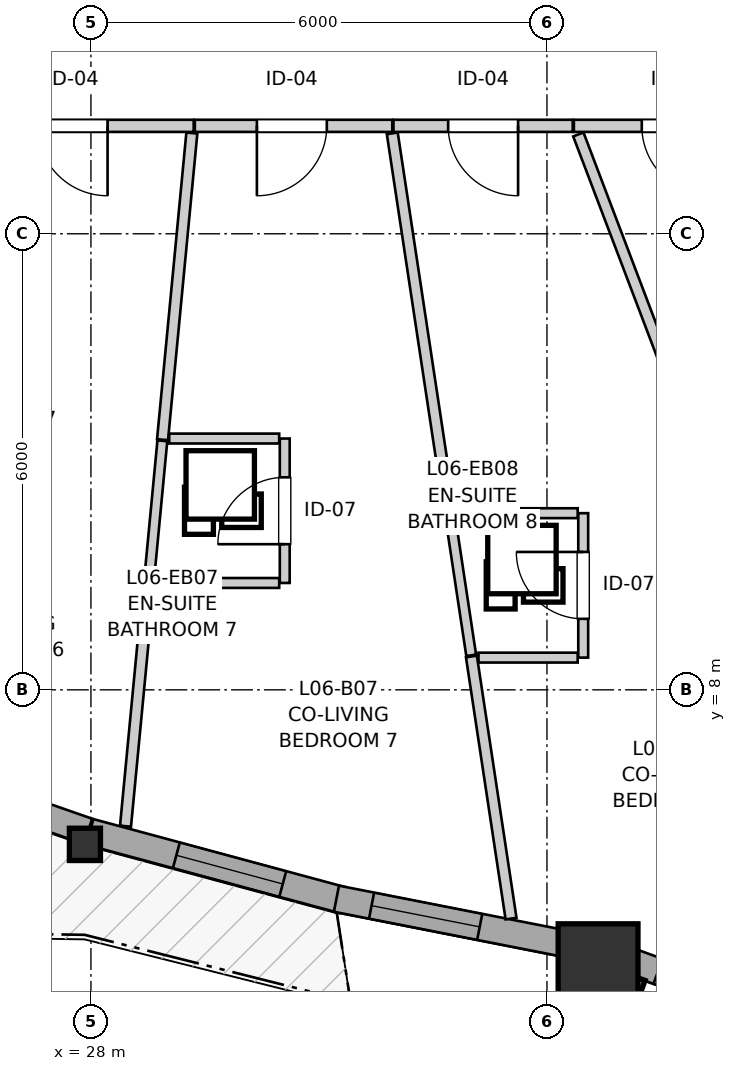
"""IFC4 building model, lengths in metres.
Left out: names, types, materials, properties, quantities, classifications, styles, units other than length and angle.
Written with IfcOpenShell. Run it as: python <this file> out.ifc"""

import sys

from ifc_helpers import new_model, si_unit, direction, frame, frame_2d, origin, origin_2d, place, context, subcontext, project, spatial, rectangle, i_section, extrude, source, transform, mapped, element, fill, save


model = new_model("IFC4")
c1 = context("Model", 3, precision=1e-05, world=origin(), true_north=direction((0.0, 1.0)))
c2 = subcontext(c1, "Body", "Model", "MODEL_VIEW")
j1 = project(units=[si_unit("LENGTHUNIT", "METRE"), si_unit("PLANEANGLEUNIT", "RADIAN")], contexts=[c1])
p1 = place(None, origin())
s1 = spatial("IfcSite", under=j1, at=p1, CompositionType="ELEMENT")
p2 = place(p1, origin())
s2 = spatial("IfcBuilding", under=s1, at=p2, CompositionType="ELEMENT")
p3 = place(p2, frame((0.0, 0.0, 23.8)))
s3 = spatial("IfcBuildingStorey", under=s2, at=p3, CompositionType="ELEMENT", Elevation=23.8)
m1 = source(origin(), c2, "Body", "SweptSolid", [
    extrude(i_section(OverallWidth=0.409, OverallDepth=0.425, WebThickness=0.03, FlangeThickness=0.048, FilletRadius=0.015, at=origin_2d()), origin(), (0.0, 0.0, 1.0), 2.935),
])
p4 = place(p3, frame((27.921, 5.967, 0.0), z_axis=(0.0, 0.0, 1.0), x_axis=(1.0, 0.0, 0.0)))
e1 = element("IfcColumn", 1, at=p4, inside=s3, PredefinedType="PILASTER", context=c2, shape_type="MappedRepresentation", body=[
    mapped(m1, transform((0.0, 0.0, 0.0), x_axis=(1.0, 0.0, 0.0), y_axis=(0.0, 1.0, 0.0), z_axis=(0.0, 0.0, 1.0), scale=1.0)),
])
m2 = source(origin(), c2, "Body", "SweptSolid", [
    extrude(rectangle(XDim=1.05, YDim=1.05, at=origin_2d()), origin(), (0.0, 0.0, 1.0), 2.935),
])
p5 = place(p3, frame((34.673, 4.397, 0.0), z_axis=(0.0, 0.0, 1.0), x_axis=(1.0, 0.0, 0.0)))
e2 = element("IfcColumn", 2, at=p5, inside=s3, PredefinedType="COLUMN", context=c2, shape_type="MappedRepresentation", body=[
    mapped(m2, transform((0.0, 0.0, 0.0), x_axis=(1.0, 0.0, 0.0), y_axis=(0.0, 1.0, 0.0), z_axis=(0.0, 0.0, 1.0), scale=1.0)),
])
p6 = place(p3, frame((24.756, 7.257, 0.0), z_axis=(0.0, 0.0, 1.0), x_axis=(0.944142925437, -0.329536244361, 0.0)))
e3 = element("IfcWall", 3, at=p6, inside=s3, PredefinedType="SOLIDWALL", context=c2, shape_type="SweptSolid", body=[
    extrude(rectangle(XDim=3.393, YDim=0.35, at=frame_2d((1.697, 0.0))), origin(), (0.0, 0.0, 1.0), 2.415),
])
p7 = place(p6, frame((0.982, 0.0, 0.82)))
e4 = element("IfcOpeningElement", 4, at=p7, cuts=e3, PredefinedType="OPENING", context=c2, shape_type="SweptSolid", body=[
    extrude(rectangle(XDim=1.45, YDim=1.25, at=frame_2d((0.725, 0.625))), frame((0.0, 0.185, 0.0), z_axis=(0.0, -1.0, 0.0), x_axis=(1.0, 0.0, 0.0)), (0.0, 0.0, 1.0), 0.37),
])
p8 = place(p3, frame((27.986, 6.131, 0.0), z_axis=(0.0, 0.0, 1.0), x_axis=(0.96546113776, -0.2605471003, 0.0)))
e5 = element("IfcWall", 5, at=p8, inside=s3, PredefinedType="SOLIDWALL", context=c2, shape_type="SweptSolid", body=[
    extrude(rectangle(XDim=3.449, YDim=0.35, at=frame_2d((1.725, 0.0))), origin(), (0.0, 0.0, 1.0), 2.415),
])
p9 = place(p8, frame((1.179, 0.0, 0.82)))
e6 = element("IfcOpeningElement", 6, at=p9, cuts=e5, PredefinedType="OPENING", context=c2, shape_type="SweptSolid", body=[
    extrude(rectangle(XDim=1.45, YDim=1.25, at=frame_2d((0.725, 0.625))), frame((0.0, 0.185, 0.0), z_axis=(0.0, -1.0, 0.0), x_axis=(1.0, 0.0, 0.0)), (0.0, 0.0, 1.0), 0.37),
])
p10 = place(p3, frame((31.23, 5.252, 0.0), z_axis=(0.0, 0.0, 1.0), x_axis=(0.981232542219, -0.192828156892, 0.0)))
e7 = element("IfcWall", 7, at=p10, inside=s3, PredefinedType="SOLIDWALL", context=c2, shape_type="SweptSolid", body=[
    extrude(rectangle(XDim=3.242, YDim=0.35, at=frame_2d((1.621, 0.0))), origin(), (0.0, 0.0, 1.0), 2.415),
])
p11 = place(p10, frame((0.471, 0.0, 0.82)))
e8 = element("IfcOpeningElement", 8, at=p11, cuts=e7, PredefinedType="OPENING", context=c2, shape_type="SweptSolid", body=[
    extrude(rectangle(XDim=1.45, YDim=1.25, at=frame_2d((0.725, 0.625))), frame((0.0, 0.185, 0.0), z_axis=(0.0, -1.0, 0.0), x_axis=(1.0, 0.0, 0.0)), (0.0, 0.0, 1.0), 0.37),
])
p12 = place(p3, frame((35.014, 4.459, 0.0), z_axis=(0.0, 0.0, 1.0), x_axis=(0.939720171257, -0.341944439541, 0.0)))
e9 = element("IfcWall", 9, at=p12, inside=s3, PredefinedType="SOLIDWALL", context=c2, shape_type="SweptSolid", body=[
    extrude(rectangle(XDim=1.752, YDim=0.35, at=frame_2d((0.876, 0.0))), origin(), (0.0, 0.0, 1.0), 2.415),
])
p13 = place(p12, frame((0.476, 0.0, 0.82)))
e10 = element("IfcOpeningElement", 10, at=p13, cuts=e9, PredefinedType="OPENING", context=c2, shape_type="SweptSolid", body=[
    extrude(rectangle(XDim=0.95, YDim=1.35, at=frame_2d((0.475, 0.675))), frame((0.0, 0.185, 0.0), z_axis=(0.0, -1.0, 0.0), x_axis=(1.0, 0.0, 0.0)), (0.0, 0.0, 1.0), 0.37),
])
p14 = place(p3, frame((29.352, 15.42, 0.0), z_axis=(0.0, 0.0, 1.0), x_axis=(-1.0, 0.0, 0.0)))
e11 = element("IfcWall", 11, at=p14, inside=s3, PredefinedType="PARTITIONING", context=c2, shape_type="SweptSolid", body=[
    extrude(rectangle(XDim=3.14, YDim=0.16, at=frame_2d((1.57, 0.0))), origin(), (0.0, 0.0, 1.0), 2.935),
])
p15 = place(p14, frame((1.133, 0.0, 0.0)))
e12 = element("IfcOpeningElement", 12, at=p15, cuts=e11, PredefinedType="OPENING", context=c2, shape_type="SweptSolid", body=[
    extrude(rectangle(XDim=0.92, YDim=2.1, at=frame_2d((0.46, 1.05))), frame((0.0, 0.09, 0.0), z_axis=(0.0, -1.0, 0.0), x_axis=(1.0, 0.0, 0.0)), (0.0, 0.0, 1.0), 0.18),
])
p16 = place(p3, frame((37.063, 15.42, 0.0), z_axis=(0.0, 0.0, 1.0), x_axis=(-1.0, 0.0, 0.0)))
e13 = element("IfcWall", 13, at=p16, inside=s3, PredefinedType="PARTITIONING", context=c2, shape_type="SweptSolid", body=[
    extrude(rectangle(XDim=2.709, YDim=0.16, at=frame_2d((1.354, 0.0))), origin(), (0.0, 0.0, 1.0), 2.935),
])
p17 = place(p16, frame((0.896, 0.0, 0.0)))
e14 = element("IfcOpeningElement", 14, at=p17, cuts=e13, PredefinedType="OPENING", context=c2, shape_type="SweptSolid", body=[
    extrude(rectangle(XDim=0.92, YDim=2.1, at=frame_2d((0.46, 1.05))), frame((0.0, 0.09, 0.0), z_axis=(0.0, -1.0, 0.0), x_axis=(1.0, 0.0, 0.0)), (0.0, 0.0, 1.0), 0.18),
])
p18 = place(p3, frame((31.965, 15.42, 0.0), z_axis=(0.0, 0.0, 1.0), x_axis=(-1.0, 0.0, 0.0)))
e15 = element("IfcWall", 15, at=p18, inside=s3, PredefinedType="PARTITIONING", context=c2, shape_type="SweptSolid", body=[
    extrude(rectangle(XDim=2.598, YDim=0.16, at=frame_2d((1.299, 0.0))), origin(), (0.0, 0.0, 1.0), 2.935),
])
p19 = place(p18, frame((0.862, 0.0, 0.0)))
e16 = element("IfcOpeningElement", 16, at=p19, cuts=e15, PredefinedType="OPENING", context=c2, shape_type="SweptSolid", body=[
    extrude(rectangle(XDim=0.92, YDim=2.1, at=frame_2d((0.46, 1.05))), frame((0.0, 0.09, 0.0), z_axis=(0.0, -1.0, 0.0), x_axis=(1.0, 0.0, 0.0)), (0.0, 0.0, 1.0), 0.18),
])
p20 = place(p3, frame((34.339, 15.42, 0.0), z_axis=(0.0, 0.0, 1.0), x_axis=(-1.0, 0.0, 0.0)))
e17 = element("IfcWall", 17, at=p20, inside=s3, PredefinedType="PARTITIONING", context=c2, shape_type="SweptSolid", body=[
    extrude(rectangle(XDim=2.359, YDim=0.16, at=frame_2d((1.18, 0.0))), origin(), (0.0, 0.0, 1.0), 2.935),
])
p21 = place(p20, frame((0.719, 0.0, 0.0)))
e18 = element("IfcOpeningElement", 18, at=p21, cuts=e17, PredefinedType="OPENING", context=c2, shape_type="SweptSolid", body=[
    extrude(rectangle(XDim=0.92, YDim=2.1, at=frame_2d((0.46, 1.05))), frame((0.0, 0.09, 0.0), z_axis=(0.0, -1.0, 0.0), x_axis=(1.0, 0.0, 0.0)), (0.0, 0.0, 1.0), 0.18),
])
p22 = place(p3, frame((34.477, 8.424, 0.0), z_axis=(0.0, 0.0, 1.0), x_axis=(0.0, 1.0, 0.0)))
e19 = element("IfcWall", 19, at=p22, inside=s3, PredefinedType="PARTITIONING", context=c2, shape_type="SweptSolid", body=[
    extrude(rectangle(XDim=1.9, YDim=0.13, at=frame_2d((0.95, 0.0))), origin(), (0.0, 0.0, 1.0), 2.935),
])
p23 = place(p22, frame((0.51, 0.0, 0.0)))
e20 = element("IfcOpeningElement", 20, at=p23, cuts=e19, PredefinedType="OPENING", context=c2, shape_type="SweptSolid", body=[
    extrude(rectangle(XDim=0.88, YDim=2.05, at=frame_2d((0.44, 1.025))), frame((0.0, 0.075, 0.0), z_axis=(0.0, -1.0, 0.0), x_axis=(1.0, 0.0, 0.0)), (0.0, 0.0, 1.0), 0.15),
])
p24 = place(p3, frame((30.55, 9.406, 0.0), z_axis=(0.0, 0.0, 1.0), x_axis=(0.0, 1.0, 0.0)))
e21 = element("IfcWall", 21, at=p24, inside=s3, PredefinedType="PARTITIONING", context=c2, shape_type="SweptSolid", body=[
    extrude(rectangle(XDim=1.9, YDim=0.13, at=frame_2d((0.95, 0.0))), origin(), (0.0, 0.0, 1.0), 2.935),
])
p25 = place(p24, frame((0.51, 0.0, 0.0)))
e22 = element("IfcOpeningElement", 22, at=p25, cuts=e21, PredefinedType="OPENING", context=c2, shape_type="SweptSolid", body=[
    extrude(rectangle(XDim=0.88, YDim=2.05, at=frame_2d((0.44, 1.025))), frame((0.0, 0.075, 0.0), z_axis=(0.0, -1.0, 0.0), x_axis=(1.0, 0.0, 0.0)), (0.0, 0.0, 1.0), 0.15),
])
p26 = place(p3, frame((34.413, 15.307, 0.0), z_axis=(0.0, 0.0, 1.0), x_axis=(0.355171610573, -0.934801116304, 0.0)))
e23 = element("IfcWall", 23, at=p26, inside=s3, PredefinedType="PARTITIONING", context=c2, shape_type="SweptSolid", body=[
    extrude(rectangle(XDim=5.177, YDim=0.145, at=frame_2d((2.589, 0.0))), origin(), (0.0, 0.0, 1.0), 2.935),
])
p27 = place(p3, frame((31.965, 15.321, 0.0), z_axis=(0.0, 0.0, 1.0), x_axis=(0.149541437001, -0.988755459464, 0.0)))
e24 = element("IfcWall", 24, at=p27, inside=s3, PredefinedType="PARTITIONING", context=c2, shape_type="SweptSolid", body=[
    extrude(rectangle(XDim=5.069, YDim=0.145, at=frame_2d((2.535, 0.0))), origin(), (0.0, 0.0, 1.0), 2.935),
])
p28 = place(p3, frame((28.942, 11.291, 0.0), z_axis=(0.0, 0.0, 1.0), x_axis=(0.095244050973, 0.995453952101, 0.0)))
e25 = element("IfcWall", 25, at=p28, inside=s3, PredefinedType="PARTITIONING", context=c2, shape_type="SweptSolid", body=[
    extrude(rectangle(XDim=4.052, YDim=0.145, at=frame_2d((2.026, 0.0))), origin(), (0.0, 0.0, 1.0), 2.935),
])
p29 = place(p3, frame((33.006, 8.439, 0.0), z_axis=(0.0, 0.0, 1.0), x_axis=(0.149510938207, -0.988760071684, 0.0)))
e26 = element("IfcWall", 26, at=p29, inside=s3, PredefinedType="PARTITIONING", context=c2, shape_type="SweptSolid", body=[
    extrude(rectangle(XDim=3.488, YDim=0.145, at=frame_2d((1.744, 0.0))), origin(), (0.0, 0.0, 1.0), 2.935),
])
p30 = place(p3, frame((28.455, 6.206, 0.0), z_axis=(0.0, 0.0, 1.0), x_axis=(0.095101625286, 0.995467568968, 0.0)))
e27 = element("IfcWall", 27, at=p30, inside=s3, PredefinedType="PARTITIONING", context=c2, shape_type="SweptSolid", body=[
    extrude(rectangle(XDim=3.229, YDim=0.145, at=frame_2d((1.615, 0.0))), origin(), (0.0, 0.0, 1.0), 2.935),
])
p31 = place(p3, frame((32.725, 10.294, 0.0), z_axis=(0.0, 0.0, 1.0), x_axis=(0.149533379282, -0.988756678096, 0.0)))
e28 = element("IfcWall", 28, at=p31, inside=s3, PredefinedType="PARTITIONING", context=c2, shape_type="SweptSolid", body=[
    extrude(rectangle(XDim=1.861, YDim=0.13, at=frame_2d((0.931, 0.0))), origin(), (0.0, 0.0, 1.0), 2.935),
])
p32 = place(p3, frame((28.764, 9.436, 0.0), z_axis=(0.0, 0.0, 1.0), x_axis=(0.094821557036, 0.995494285429, 0.0)))
e29 = element("IfcWall", 29, at=p32, inside=s3, PredefinedType="PARTITIONING", context=c2, shape_type="SweptSolid", body=[
    extrude(rectangle(XDim=1.849, YDim=0.13, at=frame_2d((0.924, 0.0))), origin(), (0.0, 0.0, 1.0), 2.935),
])
p33 = place(p3, frame((28.848, 9.406, 0.0), z_axis=(0.0, 0.0, 1.0), x_axis=(1.0, 0.0, 0.0)))
e30 = element("IfcWall", 30, at=p33, inside=s3, PredefinedType="PARTITIONING", context=c2, shape_type="SweptSolid", body=[
    extrude(rectangle(XDim=1.629, YDim=0.13, at=frame_2d((0.814, 0.0))), origin(), (0.0, 0.0, 1.0), 2.503),
])
p34 = place(p3, frame((32.812, 10.324, 0.0), z_axis=(0.0, 0.0, 1.0), x_axis=(1.0, 0.0, 0.0)))
e31 = element("IfcWall", 31, at=p34, inside=s3, PredefinedType="PARTITIONING", context=c2, shape_type="SweptSolid", body=[
    extrude(rectangle(XDim=1.592, YDim=0.13, at=frame_2d((0.796, 0.0))), origin(), (0.0, 0.0, 1.0), 2.935),
])
p35 = place(p3, frame((29.03, 11.306, 0.0), z_axis=(0.0, 0.0, 1.0), x_axis=(1.0, 0.0, 0.0)))
e32 = element("IfcWall", 32, at=p35, inside=s3, PredefinedType="PARTITIONING", context=c2, shape_type="SweptSolid", body=[
    extrude(rectangle(XDim=1.447, YDim=0.13, at=frame_2d((0.724, 0.0))), origin(), (0.0, 0.0, 1.0), 2.935),
])
p36 = place(p3, frame((33.099, 8.424, 0.0), z_axis=(0.0, 0.0, 1.0), x_axis=(1.0, 0.0, 0.0)))
e33 = element("IfcWall", 33, at=p36, inside=s3, PredefinedType="PARTITIONING", context=c2, shape_type="SweptSolid", body=[
    extrude(rectangle(XDim=1.305, YDim=0.13, at=frame_2d((0.652, 0.0))), origin(), (0.0, 0.0, 1.0), 2.503),
])
m3 = source(origin(), c2, "Body", "SweptSolid", [
    extrude(rectangle(XDim=1.45, YDim=1.25, at=frame_2d((0.725, 0.625))), frame((0.0, 0.03, 0.0), z_axis=(0.0, -1.0, 0.0), x_axis=(1.0, 0.0, 0.0)), (0.0, 0.0, 1.0), 0.06),
])
p37 = place(p9, origin())
e34 = element("IfcWindow", 34, at=p37, inside=s3, PartitioningType="SINGLE_PANEL", PredefinedType="WINDOW", context=c2, shape_type="MappedRepresentation", body=[
    mapped(m3, transform((0.0, 0.0, 0.0), x_axis=(1.0, 0.0, 0.0), y_axis=(0.0, 1.0, 0.0), z_axis=(0.0, 0.0, 1.0), scale=1.0)),
])
fill(e6, e34)
p38 = place(p11, origin())
e35 = element("IfcWindow", 35, at=p38, inside=s3, PartitioningType="SINGLE_PANEL", PredefinedType="WINDOW", context=c2, shape_type="MappedRepresentation", body=[
    mapped(m3, transform((0.0, 0.0, 0.0), x_axis=(1.0, 0.0, 0.0), y_axis=(0.0, 1.0, 0.0), z_axis=(0.0, 0.0, 1.0), scale=1.0)),
])
fill(e8, e35)
m4 = source(origin(), c2, "Body", "SweptSolid", [
    extrude(rectangle(XDim=0.92, YDim=2.1, at=frame_2d((0.46, 1.05))), frame((0.0, 0.025, 0.0), z_axis=(0.0, -1.0, 0.0), x_axis=(1.0, 0.0, 0.0)), (0.0, 0.0, 1.0), 0.05),
])
p39 = place(p15, origin())
e36 = element("IfcDoor", 36, at=p39, inside=s3, OperationType="SINGLE_SWING_LEFT", PredefinedType="DOOR", context=c2, shape_type="MappedRepresentation", body=[
    mapped(m4, transform((0.0, 0.0, 0.0), x_axis=(1.0, 0.0, 0.0), y_axis=(0.0, 1.0, 0.0), z_axis=(0.0, 0.0, 1.0), scale=1.0)),
])
fill(e12, e36)
p40 = place(p17, origin())
e37 = element("IfcDoor", 37, at=p40, inside=s3, OperationType="SINGLE_SWING_LEFT", PredefinedType="DOOR", context=c2, shape_type="MappedRepresentation", body=[
    mapped(m4, transform((0.0, 0.0, 0.0), x_axis=(1.0, 0.0, 0.0), y_axis=(0.0, 1.0, 0.0), z_axis=(0.0, 0.0, 1.0), scale=1.0)),
])
fill(e14, e37)
p41 = place(p19, origin())
e38 = element("IfcDoor", 38, at=p41, inside=s3, OperationType="SINGLE_SWING_RIGHT", PredefinedType="DOOR", context=c2, shape_type="MappedRepresentation", body=[
    mapped(m4, transform((0.0, 0.0, 0.0), x_axis=(1.0, 0.0, 0.0), y_axis=(0.0, 1.0, 0.0), z_axis=(0.0, 0.0, 1.0), scale=1.0)),
])
fill(e16, e38)
p42 = place(p21, origin())
e39 = element("IfcDoor", 39, at=p42, inside=s3, OperationType="SINGLE_SWING_LEFT", PredefinedType="DOOR", context=c2, shape_type="MappedRepresentation", body=[
    mapped(m4, transform((0.0, 0.0, 0.0), x_axis=(1.0, 0.0, 0.0), y_axis=(0.0, 1.0, 0.0), z_axis=(0.0, 0.0, 1.0), scale=1.0)),
])
fill(e18, e39)
m5 = source(origin(), c2, "Body", "SweptSolid", [
    extrude(rectangle(XDim=0.88, YDim=2.05, at=frame_2d((0.44, 1.025))), frame((0.0, 0.025, 0.0), z_axis=(0.0, -1.0, 0.0), x_axis=(1.0, 0.0, 0.0)), (0.0, 0.0, 1.0), 0.05),
])
p43 = place(p23, origin())
e40 = element("IfcDoor", 40, at=p43, inside=s3, OperationType="SINGLE_SWING_RIGHT", PredefinedType="DOOR", context=c2, shape_type="MappedRepresentation", body=[
    mapped(m5, transform((0.0, 0.0, 0.0), x_axis=(1.0, 0.0, 0.0), y_axis=(0.0, 1.0, 0.0), z_axis=(0.0, 0.0, 1.0), scale=1.0)),
])
fill(e20, e40)
p44 = place(p25, origin())
e41 = element("IfcDoor", 41, at=p44, inside=s3, OperationType="SINGLE_SWING_LEFT", PredefinedType="DOOR", context=c2, shape_type="MappedRepresentation", body=[
    mapped(m5, transform((0.0, 0.0, 0.0), x_axis=(1.0, 0.0, 0.0), y_axis=(0.0, 1.0, 0.0), z_axis=(0.0, 0.0, 1.0), scale=1.0)),
])
fill(e22, e41)
save(model, sys.argv[1])
